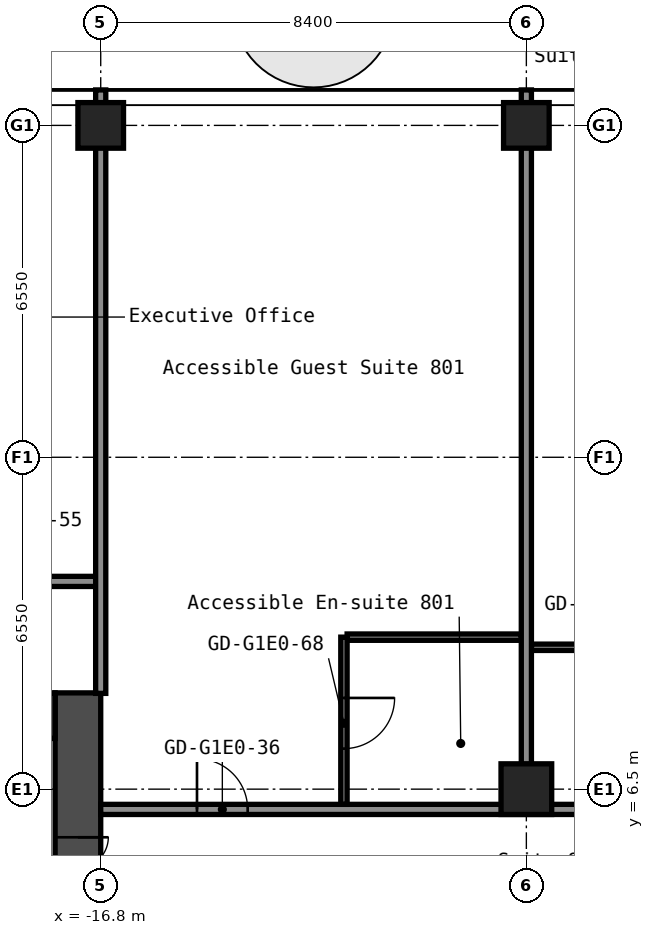
"""IFC4 building model, lengths in metres.
Left out: names, types, materials, properties, quantities, classifications, styles, units other than length and angle.
Written with IfcOpenShell. Run it as: python <this file> out.ifc"""

import sys

from ifc_helpers import new_model, si_unit, direction, frame, frame_2d, origin, origin_2d, place, context, subcontext, project, spatial, rectangle, hollow_rectangle, extrude, element, fill, save


model = new_model("IFC4")
c1 = context("Model", 3, precision=1e-05, world=origin(), true_north=direction((0.0, 1.0)))
c2 = subcontext(c1, "Body", "Model", "MODEL_VIEW")
j1 = project(units=[si_unit("LENGTHUNIT", "METRE"), si_unit("PLANEANGLEUNIT", "RADIAN")], contexts=[c1])
p1 = place(None, origin())
s1 = spatial("IfcSite", under=j1, at=p1, CompositionType="ELEMENT")
p2 = place(p1, origin())
s2 = spatial("IfcBuilding", under=s1, at=p2, CompositionType="ELEMENT")
p3 = place(p2, frame((0.0, 0.0, 32.6)))
s3 = spatial("IfcBuildingStorey", under=s2, at=p3, CompositionType="ELEMENT", Elevation=32.6)
p4 = place(p3, frame((-16.8, 19.6, 0.0), z_axis=(0.0, 0.0, 1.0), x_axis=(1.0, 0.0, 0.0)))
e1 = element("IfcColumn", 1, at=p4, inside=s3, PredefinedType="COLUMN", context=c2, shape_type="SweptSolid", body=[
    extrude(hollow_rectangle(XDim=0.9, YDim=0.9, WallThickness=0.036, at=origin_2d()), origin(), (0.0, 0.0, 1.0), 2.8),
])
p5 = place(p3, frame((-8.4, 6.5, 0.0), z_axis=(0.0, 0.0, 1.0), x_axis=(1.0, 0.0, 0.0)))
e2 = element("IfcColumn", 2, at=p5, inside=s3, PredefinedType="COLUMN", context=c2, shape_type="SweptSolid", body=[
    extrude(hollow_rectangle(XDim=1.0, YDim=1.0, WallThickness=0.04, at=origin_2d()), origin(), (0.0, 0.0, 1.0), 2.8),
])
p6 = place(p3, frame((-8.4, 19.6, 0.0), z_axis=(0.0, 0.0, 1.0), x_axis=(1.0, 0.0, 0.0)))
e3 = element("IfcColumn", 3, at=p6, inside=s3, PredefinedType="COLUMN", context=c2, shape_type="SweptSolid", body=[
    extrude(hollow_rectangle(XDim=0.9, YDim=0.9, WallThickness=0.036, at=origin_2d()), origin(), (0.0, 0.0, 1.0), 2.8),
])
p7 = place(p3, frame((-17.25, -8.4, 0.0), z_axis=(0.0, 0.0, 1.0), x_axis=(0.0, 1.0, 0.0)))
e4 = element("IfcWall", 4, at=p7, inside=s3, PredefinedType="SHEAR", context=c2, shape_type="SweptSolid", body=[
    extrude(rectangle(XDim=16.8, YDim=0.9, at=frame_2d((8.4, 0.0))), origin(), (0.0, 0.0, 1.0), 2.8),
])
p8 = place(p7, frame((12.75, 0.0, 0.0)))
e5 = element("IfcOpeningElement", 5, at=p8, cuts=e4, PredefinedType="OPENING", context=c2, shape_type="SweptSolid", body=[
    extrude(rectangle(XDim=1.2, YDim=2.1, at=frame_2d((0.6, 1.05))), frame((0.0, 0.46, 0.0), z_axis=(0.0, -1.0, 0.0), x_axis=(1.0, 0.0, 0.0)), (0.0, 0.0, 1.0), 0.92),
])
p9 = place(p7, frame((2.85, 0.0, 0.0)))
e6 = element("IfcOpeningElement", 6, at=p9, cuts=e4, PredefinedType="OPENING", context=c2, shape_type="SweptSolid", body=[
    extrude(rectangle(XDim=1.2, YDim=2.1, at=frame_2d((0.6, 1.05))), frame((0.0, 0.46, 0.0), z_axis=(0.0, -1.0, 0.0), x_axis=(1.0, 0.0, 0.0)), (0.0, 0.0, 1.0), 0.92),
])
p10 = place(p3, frame((-32.7, 7.95, 0.0), z_axis=(0.0, 0.0, 1.0), x_axis=(1.0, 0.0, 0.0)))
e7 = element("IfcWall", 7, at=p10, inside=s3, PredefinedType="SHEAR", context=c2, shape_type="SweptSolid", body=[
    extrude(rectangle(XDim=15.0, YDim=0.9, at=frame_2d((7.5, 0.0))), origin(), (0.0, 0.0, 1.0), 2.8),
])
p11 = place(p10, frame((3.4, 0.0, 0.0)))
e8 = element("IfcOpeningElement", 8, at=p11, cuts=e7, PredefinedType="OPENING", context=c2, shape_type="SweptSolid", body=[
    extrude(rectangle(XDim=1.2, YDim=2.1, at=frame_2d((0.6, 1.05))), frame((0.0, 0.46, 0.0), z_axis=(0.0, -1.0, 0.0), x_axis=(1.0, 0.0, 0.0)), (0.0, 0.0, 1.0), 0.92),
])
p12 = place(p10, frame((0.75, 0.0, 0.0)))
e9 = element("IfcOpeningElement", 9, at=p12, cuts=e7, PredefinedType="OPENING", context=c2, shape_type="SweptSolid", body=[
    extrude(rectangle(XDim=0.9, YDim=2.1, at=frame_2d((0.45, 1.05))), frame((0.0, 0.46, 0.0), z_axis=(0.0, -1.0, 0.0), x_axis=(1.0, 0.0, 0.0)), (0.0, 0.0, 1.0), 0.92),
])
p13 = place(p3, frame((-16.8, 6.1, 0.0), z_axis=(0.0, 0.0, 1.0), x_axis=(1.0, 0.0, 0.0)))
e10 = element("IfcWall", 10, at=p13, inside=s3, PredefinedType="PARTITIONING", context=c2, shape_type="SweptSolid", body=[
    extrude(rectangle(XDim=33.6, YDim=0.2, at=frame_2d((16.8, 0.0))), origin(), (0.0, 0.0, 1.0), 2.8),
])
p14 = place(p13, frame((1.9, 0.0, 0.0)))
e11 = element("IfcOpeningElement", 11, at=p14, cuts=e10, PredefinedType="OPENING", context=c2, shape_type="SweptSolid", body=[
    extrude(rectangle(XDim=1.0, YDim=2.1, at=frame_2d((0.5, 1.05))), frame((0.0, 0.11, 0.0), z_axis=(0.0, -1.0, 0.0), x_axis=(1.0, 0.0, 0.0)), (0.0, 0.0, 1.0), 0.22),
])
p15 = place(p13, frame((14.2, 0.0, 0.0)))
e12 = element("IfcOpeningElement", 12, at=p15, cuts=e10, PredefinedType="OPENING", context=c2, shape_type="SweptSolid", body=[
    extrude(rectangle(XDim=1.0, YDim=2.1, at=frame_2d((0.5, 1.05))), frame((0.0, 0.11, 0.0), z_axis=(0.0, -1.0, 0.0), x_axis=(1.0, 0.0, 0.0)), (0.0, 0.0, 1.0), 0.22),
])
p16 = place(p13, frame((18.4, 0.0, 0.0)))
e13 = element("IfcOpeningElement", 13, at=p16, cuts=e10, PredefinedType="OPENING", context=c2, shape_type="SweptSolid", body=[
    extrude(rectangle(XDim=1.0, YDim=2.1, at=frame_2d((0.5, 1.05))), frame((0.0, 0.11, 0.0), z_axis=(0.0, -1.0, 0.0), x_axis=(1.0, 0.0, 0.0)), (0.0, 0.0, 1.0), 0.22),
])
p17 = place(p13, frame((31.0, 0.0, 0.0)))
e14 = element("IfcOpeningElement", 14, at=p17, cuts=e10, PredefinedType="OPENING", context=c2, shape_type="SweptSolid", body=[
    extrude(rectangle(XDim=1.0, YDim=2.1, at=frame_2d((0.5, 1.05))), frame((0.0, 0.11, 0.0), z_axis=(0.0, -1.0, 0.0), x_axis=(1.0, 0.0, 0.0)), (0.0, 0.0, 1.0), 0.22),
])
p18 = place(p3, frame((-8.3, 9.3, 0.0), z_axis=(0.0, 0.0, 1.0), x_axis=(1.0, 0.0, 0.0)))
e15 = element("IfcWall", 15, at=p18, inside=s3, PredefinedType="PARTITIONING", context=c2, shape_type="SweptSolid", body=[
    extrude(rectangle(XDim=2.838, YDim=0.125, at=frame_2d((1.419, 0.0))), origin(), (0.0, 0.0, 1.0), 2.8),
])
p19 = place(p18, frame((1.0, 0.0, 0.0)))
e16 = element("IfcOpeningElement", 16, at=p19, cuts=e15, PredefinedType="OPENING", context=c2, shape_type="SweptSolid", body=[
    extrude(rectangle(XDim=0.8, YDim=2.1, at=frame_2d((0.4, 1.05))), frame((0.0, 0.073, 0.0), z_axis=(0.0, -1.0, 0.0), x_axis=(1.0, 0.0, 0.0)), (0.0, 0.0, 1.0), 0.145),
])
p20 = place(p3, frame((-11.938, 9.5, 0.0), z_axis=(0.0, 0.0, 1.0), x_axis=(1.0, 0.0, 0.0)))
e17 = element("IfcWall", 17, at=p20, inside=s3, PredefinedType="PARTITIONING", context=c2, shape_type="SweptSolid", body=[
    extrude(rectangle(XDim=3.438, YDim=0.125, at=frame_2d((1.719, 0.0))), origin(), (0.0, 0.0, 1.0), 2.8),
])
p21 = place(p3, frame((-51.1, 10.6, 0.0), z_axis=(0.0, 0.0, 1.0), x_axis=(1.0, 0.0, 0.0)))
e18 = element("IfcWall", 18, at=p21, inside=s3, PredefinedType="PARTITIONING", context=c2, shape_type="SweptSolid", body=[
    extrude(rectangle(XDim=34.3, YDim=0.2, at=frame_2d((17.15, 0.0))), origin(), (0.0, 0.0, 1.0), 2.8),
])
p22 = place(p21, frame((4.2, 0.0, 0.0)))
e19 = element("IfcOpeningElement", 19, at=p22, cuts=e18, PredefinedType="OPENING", context=c2, shape_type="SweptSolid", body=[
    extrude(rectangle(XDim=1.0, YDim=2.1, at=frame_2d((0.5, 1.05))), frame((0.0, 0.11, 0.0), z_axis=(0.0, -1.0, 0.0), x_axis=(1.0, 0.0, 0.0)), (0.0, 0.0, 1.0), 0.22),
])
p23 = place(p21, frame((10.245, 0.0, 0.0)))
e20 = element("IfcOpeningElement", 20, at=p23, cuts=e18, PredefinedType="OPENING", context=c2, shape_type="SweptSolid", body=[
    extrude(rectangle(XDim=0.9, YDim=2.1, at=frame_2d((0.45, 1.05))), frame((0.0, 0.11, 0.0), z_axis=(0.0, -1.0, 0.0), x_axis=(1.0, 0.0, 0.0)), (0.0, 0.0, 1.0), 0.22),
])
p24 = place(p21, frame((14.445, 0.0, 0.0)))
e21 = element("IfcOpeningElement", 21, at=p24, cuts=e18, PredefinedType="OPENING", context=c2, shape_type="SweptSolid", body=[
    extrude(rectangle(XDim=0.9, YDim=2.1, at=frame_2d((0.45, 1.05))), frame((0.0, 0.11, 0.0), z_axis=(0.0, -1.0, 0.0), x_axis=(1.0, 0.0, 0.0)), (0.0, 0.0, 1.0), 0.22),
])
p25 = place(p21, frame((18.815, 0.0, 0.0)))
e22 = element("IfcOpeningElement", 22, at=p25, cuts=e18, PredefinedType="OPENING", context=c2, shape_type="SweptSolid", body=[
    extrude(rectangle(XDim=0.9, YDim=2.1, at=frame_2d((0.45, 1.05))), frame((0.0, 0.11, 0.0), z_axis=(0.0, -1.0, 0.0), x_axis=(1.0, 0.0, 0.0)), (0.0, 0.0, 1.0), 0.22),
])
p26 = place(p21, frame((23.015, 0.0, 0.0)))
e23 = element("IfcOpeningElement", 23, at=p26, cuts=e18, PredefinedType="OPENING", context=c2, shape_type="SweptSolid", body=[
    extrude(rectangle(XDim=0.9, YDim=2.1, at=frame_2d((0.45, 1.05))), frame((0.0, 0.11, 0.0), z_axis=(0.0, -1.0, 0.0), x_axis=(1.0, 0.0, 0.0)), (0.0, 0.0, 1.0), 0.22),
])
p27 = place(p21, frame((28.14, 0.0, 0.0)))
e24 = element("IfcOpeningElement", 24, at=p27, cuts=e18, PredefinedType="OPENING", context=c2, shape_type="SweptSolid", body=[
    extrude(rectangle(XDim=0.9, YDim=2.1, at=frame_2d((0.45, 1.05))), frame((0.0, 0.11, 0.0), z_axis=(0.0, -1.0, 0.0), x_axis=(1.0, 0.0, 0.0)), (0.0, 0.0, 1.0), 0.22),
])
p28 = place(p21, frame((32.34, 0.0, 0.0)))
e25 = element("IfcOpeningElement", 25, at=p28, cuts=e18, PredefinedType="OPENING", context=c2, shape_type="SweptSolid", body=[
    extrude(rectangle(XDim=0.9, YDim=2.1, at=frame_2d((0.45, 1.05))), frame((0.0, 0.11, 0.0), z_axis=(0.0, -1.0, 0.0), x_axis=(1.0, 0.0, 0.0)), (0.0, 0.0, 1.0), 0.22),
])
p29 = place(p3, frame((-16.8, 8.39, 0.0), z_axis=(0.0, 0.0, 1.0), x_axis=(0.0, 1.0, 0.0)))
e26 = element("IfcWall", 26, at=p29, inside=s3, PredefinedType="PARTITIONING", context=c2, shape_type="SweptSolid", body=[
    extrude(rectangle(XDim=11.91, YDim=0.2, at=frame_2d((5.955, 0.0))), origin(), (0.0, 0.0, 1.0), 2.8),
])
p30 = place(p3, frame((-12.0, 6.2, 0.0), z_axis=(0.0, 0.0, 1.0), x_axis=(0.0, 1.0, 0.0)))
e27 = element("IfcWall", 27, at=p30, inside=s3, PredefinedType="PARTITIONING", context=c2, shape_type="SweptSolid", body=[
    extrude(rectangle(XDim=3.3, YDim=0.125, at=frame_2d((1.65, 0.0))), origin(), (0.0, 0.0, 1.0), 2.8),
])
p31 = place(p30, frame((1.1, 0.0, 0.0)))
e28 = element("IfcOpeningElement", 28, at=p31, cuts=e27, PredefinedType="OPENING", context=c2, shape_type="SweptSolid", body=[
    extrude(rectangle(XDim=1.0, YDim=2.1, at=frame_2d((0.5, 1.05))), frame((0.0, 0.073, 0.0), z_axis=(0.0, -1.0, 0.0), x_axis=(1.0, 0.0, 0.0)), (0.0, 0.0, 1.0), 0.145),
])
p32 = place(p3, frame((-8.4, 6.99, 0.0), z_axis=(0.0, 0.0, 1.0), x_axis=(0.0, 1.0, 0.0)))
e29 = element("IfcWall", 29, at=p32, inside=s3, PredefinedType="PARTITIONING", context=c2, shape_type="SweptSolid", body=[
    extrude(rectangle(XDim=13.31, YDim=0.2, at=frame_2d((6.655, 0.0))), origin(), (0.0, 0.0, 1.0), 2.8),
])
p33 = place(p8, origin())
e30 = element("IfcDoor", 30, at=p33, inside=s3, OperationType="DOUBLE_DOOR_SINGLE_SWING", PredefinedType="DOOR", context=c2, shape_type="SweptSolid", body=[
    extrude(rectangle(XDim=1.2, YDim=2.1, at=frame_2d((0.6, 1.05))), frame((0.0, 0.025, 0.0), z_axis=(0.0, -1.0, 0.0), x_axis=(1.0, 0.0, 0.0)), (0.0, 0.0, 1.0), 0.05),
])
fill(e5, e30)
p34 = place(p14, origin())
e31 = element("IfcDoor", 31, at=p34, inside=s3, OperationType="SINGLE_SWING_RIGHT", PredefinedType="DOOR", context=c2, shape_type="SweptSolid", body=[
    extrude(rectangle(XDim=1.0, YDim=2.1, at=frame_2d((0.5, 1.05))), frame((0.0, 0.025, 0.0), z_axis=(0.0, -1.0, 0.0), x_axis=(1.0, 0.0, 0.0)), (0.0, 0.0, 1.0), 0.05),
])
fill(e11, e31)
p35 = place(p31, origin())
e32 = element("IfcDoor", 32, at=p35, inside=s3, OperationType="SINGLE_SWING_RIGHT", PredefinedType="DOOR", context=c2, shape_type="SweptSolid", body=[
    extrude(rectangle(XDim=1.0, YDim=2.1, at=frame_2d((0.5, 1.05))), frame((0.0, 0.025, 0.0), z_axis=(0.0, -1.0, 0.0), x_axis=(1.0, 0.0, 0.0)), (0.0, 0.0, 1.0), 0.05),
])
fill(e28, e32)
save(model, sys.argv[1])
